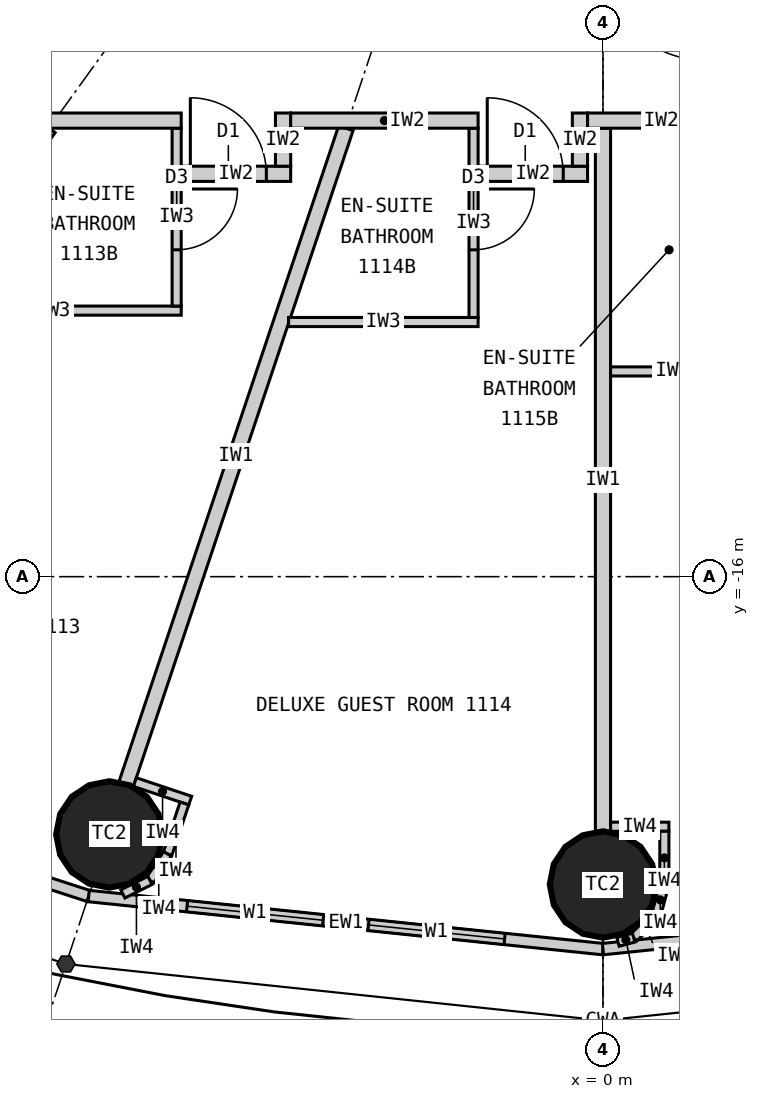
"""IFC4 building model, lengths in metres.
Left out: names, types, materials, properties, quantities, classifications, styles, units other than length and angle.
Written with IfcOpenShell. Run it as: python <this file> out.ifc"""

import sys

from ifc_helpers import new_model, si_unit, direction, frame, frame_2d, origin, origin_2d, place, context, subcontext, project, spatial, rectangle, circle, extrude, element, fill, save


model = new_model("IFC4")
c1 = context("Model", 3, precision=1e-05, world=origin(), true_north=direction((0.0, 1.0)))
c2 = subcontext(c1, "Body", "Model", "MODEL_VIEW")
j1 = project(units=[si_unit("LENGTHUNIT", "METRE"), si_unit("PLANEANGLEUNIT", "RADIAN")], contexts=[c1])
p1 = place(None, origin())
s1 = spatial("IfcSite", under=j1, at=p1, CompositionType="ELEMENT")
p2 = place(p1, origin())
s2 = spatial("IfcBuilding", under=s1, at=p2, CompositionType="ELEMENT")
p3 = place(p2, frame((0.0, 0.0, 50.7)))
s3 = spatial("IfcBuildingStorey", under=s2, at=p3, CompositionType="ELEMENT", Elevation=50.7)
for number, where, z_axis, x_axis in (
    (1, (-6.495, -19.391, 0.0), (0.0, 0.0, 1.0), (1.0, 0.0, 0.0)),
    (2, (0.0, -20.05, 0.0), (0.0, 0.0, 1.0), (1.0, 0.0, 0.0)),
):
    element("IfcColumn", number, at=place(p3, frame(where, z_axis=z_axis, x_axis=x_axis)), inside=s3, PredefinedType="COLUMN", context=c2, shape_type="SweptSolid", body=[
        extrude(circle(Radius=0.7, at=origin_2d()), origin(), (0.0, 0.0, 1.0), 3.3),
    ])
p4 = place(p3, frame((-13.096, -18.147, 0.0), z_axis=(0.0, 0.0, 1.0), x_axis=(0.951137534625, -0.308767534285, 0.0)))
e3 = element("IfcWall", 3, at=p4, inside=s3, PredefinedType="ELEMENTEDWALL", context=c2, shape_type="SweptSolid", body=[
    extrude(rectangle(XDim=6.655, YDim=0.15, at=frame_2d((3.328, 0.0))), origin(), (0.0, 0.0, 1.0), 3.12),
])
p5 = place(p4, frame((1.228, 0.0, 0.9)))
e4 = element("IfcOpeningElement", 4, at=p5, cuts=e3, PredefinedType="OPENING", context=c2, shape_type="SweptSolid", body=[
    extrude(rectangle(XDim=1.8, YDim=1.9, at=frame_2d((0.9, 0.95))), frame((0.0, 0.085, 0.0), z_axis=(0.0, -1.0, 0.0), x_axis=(1.0, 0.0, 0.0)), (0.0, 0.0, 1.0), 0.17),
])
p6 = place(p4, frame((3.628, 0.0, 0.9)))
e5 = element("IfcOpeningElement", 5, at=p6, cuts=e3, PredefinedType="OPENING", context=c2, shape_type="SweptSolid", body=[
    extrude(rectangle(XDim=1.8, YDim=1.9, at=frame_2d((0.9, 0.95))), frame((0.0, 0.085, 0.0), z_axis=(0.0, -1.0, 0.0), x_axis=(1.0, 0.0, 0.0)), (0.0, 0.0, 1.0), 0.17),
])
p7 = place(p3, frame((-6.766, -20.202, 0.0), z_axis=(0.0, 0.0, 1.0), x_axis=(0.994721394369, -0.102612609291, 0.0)))
e6 = element("IfcWall", 6, at=p7, inside=s3, PredefinedType="ELEMENTEDWALL", context=c2, shape_type="SweptSolid", body=[
    extrude(rectangle(XDim=6.802, YDim=0.15, at=frame_2d((3.401, 0.0))), origin(), (0.0, 0.0, 1.0), 3.12),
])
p8 = place(p7, frame((1.301, 0.0, 0.9)))
e7 = element("IfcOpeningElement", 7, at=p8, cuts=e6, PredefinedType="OPENING", context=c2, shape_type="SweptSolid", body=[
    extrude(rectangle(XDim=1.8, YDim=1.9, at=frame_2d((0.9, 0.95))), frame((0.0, 0.085, 0.0), z_axis=(0.0, -1.0, 0.0), x_axis=(1.0, 0.0, 0.0)), (0.0, 0.0, 1.0), 0.17),
])
p9 = place(p7, frame((3.701, 0.0, 0.9)))
e8 = element("IfcOpeningElement", 8, at=p9, cuts=e6, PredefinedType="OPENING", context=c2, shape_type="SweptSolid", body=[
    extrude(rectangle(XDim=1.8, YDim=1.9, at=frame_2d((0.9, 0.95))), frame((0.0, 0.085, 0.0), z_axis=(0.0, -1.0, 0.0), x_axis=(1.0, 0.0, 0.0)), (0.0, 0.0, 1.0), 0.17),
])
p10 = place(p3, frame((0.0, -20.9, 0.0), z_axis=(0.0, 0.0, 1.0), x_axis=(0.994721394369, 0.102612609291, 0.0)))
e9 = element("IfcWall", 9, at=p10, inside=s3, PredefinedType="ELEMENTEDWALL", context=c2, shape_type="SweptSolid", body=[
    extrude(rectangle(XDim=6.802, YDim=0.15, at=frame_2d((3.401, 0.0))), origin(), (0.0, 0.0, 1.0), 3.12),
])
p11 = place(p10, frame((1.301, 0.0, 0.9)))
e10 = element("IfcOpeningElement", 10, at=p11, cuts=e9, PredefinedType="OPENING", context=c2, shape_type="SweptSolid", body=[
    extrude(rectangle(XDim=1.8, YDim=1.9, at=frame_2d((0.9, 0.95))), frame((0.0, 0.085, 0.0), z_axis=(0.0, -1.0, 0.0), x_axis=(1.0, 0.0, 0.0)), (0.0, 0.0, 1.0), 0.17),
])
p12 = place(p10, frame((3.701, 0.0, 0.9)))
e11 = element("IfcOpeningElement", 11, at=p12, cuts=e9, PredefinedType="OPENING", context=c2, shape_type="SweptSolid", body=[
    extrude(rectangle(XDim=1.8, YDim=1.9, at=frame_2d((0.9, 0.95))), frame((0.0, 0.085, 0.0), z_axis=(0.0, -1.0, 0.0), x_axis=(1.0, 0.0, 0.0)), (0.0, 0.0, 1.0), 0.17),
])
p13 = place(p3, frame((-7.289, -10.1, 0.0), z_axis=(0.0, 0.0, 1.0), x_axis=(-0.585198353053, -0.810890182197, 0.0)))
e12 = element("IfcWall", 12, at=p13, inside=s3, PredefinedType="PARTITIONING", context=c2, shape_type="SweptSolid", body=[
    extrude(rectangle(XDim=8.36, YDim=0.2, at=frame_2d((4.18, 0.0))), origin(), (0.0, 0.0, 1.0), 2.32),
])
p14 = place(p3, frame((-3.383, -10.1, 0.0), z_axis=(0.0, 0.0, 1.0), x_axis=(-0.31759592231, -0.948226149256, 0.0)))
e13 = element("IfcWall", 13, at=p14, inside=s3, PredefinedType="PARTITIONING", context=c2, shape_type="SweptSolid", body=[
    extrude(rectangle(XDim=9.098, YDim=0.2, at=frame_2d((4.549, 0.0))), origin(), (0.0, 0.0, 1.0), 2.32),
])
p15 = place(p3, frame((0.0, -10.1, 0.0), z_axis=(0.0, 0.0, 1.0), x_axis=(0.0, -1.0, 0.0)))
e14 = element("IfcWall", 14, at=p15, inside=s3, PredefinedType="PARTITIONING", context=c2, shape_type="SweptSolid", body=[
    extrude(rectangle(XDim=9.25, YDim=0.2, at=frame_2d((4.625, 0.0))), origin(), (0.0, 0.0, 1.0), 2.32),
])
p16 = place(p3, frame((-8.921, -12.5, 0.0), z_axis=(0.0, 0.0, 1.0), x_axis=(1.0, 0.0, 0.0)))
e15 = element("IfcWall", 15, at=p16, inside=s3, PredefinedType="PARTITIONING", context=c2, shape_type="SweptSolid", body=[
    extrude(rectangle(XDim=3.372, YDim=0.12, at=frame_2d((1.686, 0.0))), origin(), (0.0, 0.0, 1.0), 3.12),
])
p17 = place(p3, frame((-5.609, -10.1, 0.0), z_axis=(0.0, 0.0, 1.0), x_axis=(0.0, -1.0, 0.0)))
e16 = element("IfcWall", 16, at=p17, inside=s3, PredefinedType="PARTITIONING", context=c2, shape_type="SweptSolid", body=[
    extrude(rectangle(XDim=2.34, YDim=0.12, at=frame_2d((1.17, 0.0))), origin(), (0.0, 0.0, 1.0), 3.12),
])
p18 = place(p17, frame((0.8, 0.0, 0.0)))
e17 = element("IfcOpeningElement", 17, at=p18, cuts=e16, PredefinedType="OPENING", context=c2, shape_type="SweptSolid", body=[
    extrude(rectangle(XDim=0.8, YDim=2.1, at=frame_2d((0.4, 1.05))), frame((0.0, 0.07, 0.0), z_axis=(0.0, -1.0, 0.0), x_axis=(1.0, 0.0, 0.0)), (0.0, 0.0, 1.0), 0.14),
])
p19 = place(p3, frame((-4.137, -12.65, 0.0), z_axis=(0.0, 0.0, 1.0), x_axis=(1.0, 0.0, 0.0)))
e18 = element("IfcWall", 18, at=p19, inside=s3, PredefinedType="PARTITIONING", context=c2, shape_type="SweptSolid", body=[
    extrude(rectangle(XDim=2.494, YDim=0.12, at=frame_2d((1.247, 0.0))), origin(), (0.0, 0.0, 1.0), 3.12),
])
p20 = place(p3, frame((-1.703, -10.1, 0.0), z_axis=(0.0, 0.0, 1.0), x_axis=(0.0, -1.0, 0.0)))
e19 = element("IfcWall", 19, at=p20, inside=s3, PredefinedType="PARTITIONING", context=c2, shape_type="SweptSolid", body=[
    extrude(rectangle(XDim=2.49, YDim=0.12, at=frame_2d((1.245, 0.0))), origin(), (0.0, 0.0, 1.0), 3.12),
])
p21 = place(p20, frame((0.8, 0.0, 0.0)))
e20 = element("IfcOpeningElement", 20, at=p21, cuts=e19, PredefinedType="OPENING", context=c2, shape_type="SweptSolid", body=[
    extrude(rectangle(XDim=0.8, YDim=2.1, at=frame_2d((0.4, 1.05))), frame((0.0, 0.07, 0.0), z_axis=(0.0, -1.0, 0.0), x_axis=(1.0, 0.0, 0.0)), (0.0, 0.0, 1.0), 0.14),
])
p22 = place(p3, frame((0.1, -13.3, 0.0), z_axis=(0.0, 0.0, 1.0), x_axis=(1.0, 0.0, 0.0)))
e21 = element("IfcWall", 21, at=p22, inside=s3, PredefinedType="PARTITIONING", context=c2, shape_type="SweptSolid", body=[
    extrude(rectangle(XDim=1.64, YDim=0.12, at=frame_2d((0.82, 0.0))), origin(), (0.0, 0.0, 1.0), 3.12),
])
p23 = place(p3, frame((-4.109, -10.7, 0.0), z_axis=(0.0, 0.0, 1.0), x_axis=(-1.0, 0.0, 0.0)))
e22 = element("IfcWall", 22, at=p23, inside=s3, PredefinedType="PARTITIONING", context=c2, shape_type="SweptSolid", body=[
    extrude(rectangle(XDim=1.44, YDim=0.2, at=frame_2d((0.72, 0.0))), origin(), (0.0, 0.0, 1.0), 3.12),
])
p24 = place(p23, frame((0.32, 0.0, 0.0)))
e23 = element("IfcOpeningElement", 23, at=p24, cuts=e22, PredefinedType="OPENING", context=c2, shape_type="SweptSolid", body=[
    extrude(rectangle(XDim=1.0, YDim=2.2, at=frame_2d((0.5, 1.1))), frame((0.0, 0.11, 0.0), z_axis=(0.0, -1.0, 0.0), x_axis=(1.0, 0.0, 0.0)), (0.0, 0.0, 1.0), 0.22),
])
p25 = place(p3, frame((-4.209, -9.9, 0.0), z_axis=(0.0, 0.0, 1.0), x_axis=(0.0, -1.0, 0.0)))
e24 = element("IfcWall", 24, at=p25, inside=s3, PredefinedType="PARTITIONING", context=c2, shape_type="SweptSolid", body=[
    extrude(rectangle(XDim=0.7, YDim=0.2, at=frame_2d((0.35, 0.0))), origin(), (0.0, 0.0, 1.0), 3.12),
])
p26 = place(p3, frame((-0.203, -10.7, 0.0), z_axis=(0.0, 0.0, 1.0), x_axis=(-1.0, 0.0, 0.0)))
e25 = element("IfcWall", 25, at=p26, inside=s3, PredefinedType="PARTITIONING", context=c2, shape_type="SweptSolid", body=[
    extrude(rectangle(XDim=1.44, YDim=0.2, at=frame_2d((0.72, 0.0))), origin(), (0.0, 0.0, 1.0), 3.12),
])
p27 = place(p26, frame((0.32, 0.0, 0.0)))
e26 = element("IfcOpeningElement", 26, at=p27, cuts=e25, PredefinedType="OPENING", context=c2, shape_type="SweptSolid", body=[
    extrude(rectangle(XDim=1.0, YDim=2.2, at=frame_2d((0.5, 1.1))), frame((0.0, 0.11, 0.0), z_axis=(0.0, -1.0, 0.0), x_axis=(1.0, 0.0, 0.0)), (0.0, 0.0, 1.0), 0.22),
])
p28 = place(p3, frame((-0.303, -9.9, 0.0), z_axis=(0.0, 0.0, 1.0), x_axis=(0.0, -1.0, 0.0)))
e27 = element("IfcWall", 27, at=p28, inside=s3, PredefinedType="PARTITIONING", context=c2, shape_type="SweptSolid", body=[
    extrude(rectangle(XDim=0.7, YDim=0.2, at=frame_2d((0.35, 0.0))), origin(), (0.0, 0.0, 1.0), 3.12),
])
p29 = place(p3, frame((1.74, -10.0, 0.0), z_axis=(0.0, 0.0, 1.0), x_axis=(-1.0, 0.0, 0.0)))
e28 = element("IfcWall", 28, at=p29, inside=s3, PredefinedType="PARTITIONING", context=c2, shape_type="SweptSolid", body=[
    extrude(rectangle(XDim=1.943, YDim=0.2, at=frame_2d((0.971, 0.0))), origin(), (0.0, 0.0, 1.0), 3.12),
])
p30 = place(p3, frame((-1.643, -10.0, 0.0), z_axis=(0.0, 0.0, 1.0), x_axis=(-1.0, 0.0, 0.0)))
e29 = element("IfcWall", 29, at=p30, inside=s3, PredefinedType="PARTITIONING", context=c2, shape_type="SweptSolid", body=[
    extrude(rectangle(XDim=2.466, YDim=0.2, at=frame_2d((1.233, 0.0))), origin(), (0.0, 0.0, 1.0), 3.12),
])
p31 = place(p3, frame((-5.549, -10.0, 0.0), z_axis=(0.0, 0.0, 1.0), x_axis=(-1.0, 0.0, 0.0)))
e30 = element("IfcWall", 30, at=p31, inside=s3, PredefinedType="PARTITIONING", context=c2, shape_type="SweptSolid", body=[
    extrude(rectangle(XDim=3.896, YDim=0.2, at=frame_2d((1.948, 0.0))), origin(), (0.0, 0.0, 1.0), 3.12),
])
p32 = place(p3, frame((-6.159, -18.702, 0.0), z_axis=(0.0, 0.0, 1.0), x_axis=(0.948173154049, -0.31775410295, 0.0)))
e31 = element("IfcWall", 31, at=p32, inside=s3, PredefinedType="PARTITIONING", context=c2, shape_type="SweptSolid", body=[
    extrude(rectangle(XDim=0.768, YDim=0.12, at=frame_2d((0.384, 0.0))), origin(), (0.0, 0.0, 1.0), 3.12),
])
p33 = place(p3, frame((-5.507, -18.984, 0.0), z_axis=(0.0, 0.0, 1.0), x_axis=(-0.317692050622, -0.948193946918, 0.0)))
e32 = element("IfcWall", 32, at=p33, inside=s3, PredefinedType="PARTITIONING", context=c2, shape_type="SweptSolid", body=[
    extrude(rectangle(XDim=0.7, YDim=0.12, at=frame_2d((0.35, 0.0))), origin(), (0.0, 0.0, 1.0), 3.12),
])
p34 = place(p3, frame((-5.729, -19.648, 0.0), z_axis=(0.0, 0.0, 1.0), x_axis=(-0.552135764955, -0.833754218615, 0.0)))
e33 = element("IfcWall", 33, at=p34, inside=s3, PredefinedType="PARTITIONING", context=c2, shape_type="SweptSolid", body=[
    extrude(rectangle(XDim=0.418, YDim=0.12, at=frame_2d((0.209, 0.0))), origin(), (0.0, 0.0, 1.0), 3.12),
])
p35 = place(p3, frame((-5.96, -19.996, 0.0), z_axis=(0.0, 0.0, 1.0), x_axis=(-0.895160725913, -0.445743507842, 0.0)))
e34 = element("IfcWall", 34, at=p35, inside=s3, PredefinedType="PARTITIONING", context=c2, shape_type="SweptSolid", body=[
    extrude(rectangle(XDim=0.399, YDim=0.12, at=frame_2d((0.199, 0.0))), origin(), (0.0, 0.0, 1.0), 3.12),
])
p36 = place(p3, frame((0.1, -19.29, 0.0), z_axis=(0.0, 0.0, 1.0), x_axis=(1.0, 0.0, 0.0)))
e35 = element("IfcWall", 35, at=p36, inside=s3, PredefinedType="PARTITIONING", context=c2, shape_type="SweptSolid", body=[
    extrude(rectangle(XDim=0.767, YDim=0.12, at=frame_2d((0.384, 0.0))), origin(), (0.0, 0.0, 1.0), 3.12),
])
p37 = place(p3, frame((0.808, -19.35, 0.0), z_axis=(0.0, 0.0, 1.0), x_axis=(0.0, -1.0, 0.0)))
e36 = element("IfcWall", 36, at=p37, inside=s3, PredefinedType="PARTITIONING", context=c2, shape_type="SweptSolid", body=[
    extrude(rectangle(XDim=0.7, YDim=0.12, at=frame_2d((0.35, 0.0))), origin(), (0.0, 0.0, 1.0), 3.12),
])
p38 = place(p3, frame((0.808, -20.05, 0.0), z_axis=(0.0, 0.0, 1.0), x_axis=(-0.2592614205, -0.965807183573, 0.0)))
e37 = element("IfcWall", 37, at=p38, inside=s3, PredefinedType="PARTITIONING", context=c2, shape_type="SweptSolid", body=[
    extrude(rectangle(XDim=0.418, YDim=0.12, at=frame_2d((0.209, 0.0))), origin(), (0.0, 0.0, 1.0), 3.12),
])
p39 = place(p3, frame((0.699, -20.454, 0.0), z_axis=(0.0, 0.0, 1.0), x_axis=(-0.707106781187, -0.707106781187, 0.0)))
e38 = element("IfcWall", 38, at=p39, inside=s3, PredefinedType="PARTITIONING", context=c2, shape_type="SweptSolid", body=[
    extrude(rectangle(XDim=0.418, YDim=0.12, at=frame_2d((0.209, 0.0))), origin(), (0.0, 0.0, 1.0), 3.12),
])
p40 = place(p3, frame((0.404, -20.749, 0.0), z_axis=(0.0, 0.0, 1.0), x_axis=(-0.965759066438, -0.25944060128, 0.0)))
e39 = element("IfcWall", 39, at=p40, inside=s3, PredefinedType="PARTITIONING", context=c2, shape_type="SweptSolid", body=[
    extrude(rectangle(XDim=0.214, YDim=0.12, at=frame_2d((0.107, 0.0))), origin(), (0.0, 0.0, 1.0), 3.12),
])
p41 = place(p8, origin())
e40 = element("IfcWindow", 40, at=p41, inside=s3, PartitioningType="SINGLE_PANEL", PredefinedType="WINDOW", context=c2, shape_type="SweptSolid", body=[
    extrude(rectangle(XDim=1.8, YDim=1.9, at=frame_2d((0.9, 0.95))), frame((0.0, 0.03, 0.0), z_axis=(0.0, -1.0, 0.0), x_axis=(1.0, 0.0, 0.0)), (0.0, 0.0, 1.0), 0.06),
])
fill(e7, e40)
p42 = place(p9, origin())
e41 = element("IfcWindow", 41, at=p42, inside=s3, PartitioningType="SINGLE_PANEL", PredefinedType="WINDOW", context=c2, shape_type="SweptSolid", body=[
    extrude(rectangle(XDim=1.8, YDim=1.9, at=frame_2d((0.9, 0.95))), frame((0.0, 0.03, 0.0), z_axis=(0.0, -1.0, 0.0), x_axis=(1.0, 0.0, 0.0)), (0.0, 0.0, 1.0), 0.06),
])
fill(e8, e41)
p43 = place(p18, origin())
e42 = element("IfcDoor", 42, at=p43, inside=s3, OperationType="SINGLE_SWING_LEFT", PredefinedType="DOOR", context=c2, shape_type="SweptSolid", body=[
    extrude(rectangle(XDim=0.8, YDim=2.1, at=frame_2d((0.4, 1.05))), frame((0.0, 0.025, 0.0), z_axis=(0.0, -1.0, 0.0), x_axis=(1.0, 0.0, 0.0)), (0.0, 0.0, 1.0), 0.05),
])
fill(e17, e42)
p44 = place(p24, origin())
e43 = element("IfcDoor", 43, at=p44, inside=s3, OperationType="SINGLE_SWING_RIGHT", PredefinedType="DOOR", context=c2, shape_type="SweptSolid", body=[
    extrude(rectangle(XDim=1.0, YDim=2.2, at=frame_2d((0.5, 1.1))), frame((0.0, 0.025, 0.0), z_axis=(0.0, -1.0, 0.0), x_axis=(1.0, 0.0, 0.0)), (0.0, 0.0, 1.0), 0.05),
])
fill(e23, e43)
p45 = place(p21, origin())
e44 = element("IfcDoor", 44, at=p45, inside=s3, OperationType="SINGLE_SWING_LEFT", PredefinedType="DOOR", context=c2, shape_type="SweptSolid", body=[
    extrude(rectangle(XDim=0.8, YDim=2.1, at=frame_2d((0.4, 1.05))), frame((0.0, 0.025, 0.0), z_axis=(0.0, -1.0, 0.0), x_axis=(1.0, 0.0, 0.0)), (0.0, 0.0, 1.0), 0.05),
])
fill(e20, e44)
p46 = place(p27, origin())
e45 = element("IfcDoor", 45, at=p46, inside=s3, OperationType="SINGLE_SWING_RIGHT", PredefinedType="DOOR", context=c2, shape_type="SweptSolid", body=[
    extrude(rectangle(XDim=1.0, YDim=2.2, at=frame_2d((0.5, 1.1))), frame((0.0, 0.025, 0.0), z_axis=(0.0, -1.0, 0.0), x_axis=(1.0, 0.0, 0.0)), (0.0, 0.0, 1.0), 0.05),
])
fill(e26, e45)
save(model, sys.argv[1])
